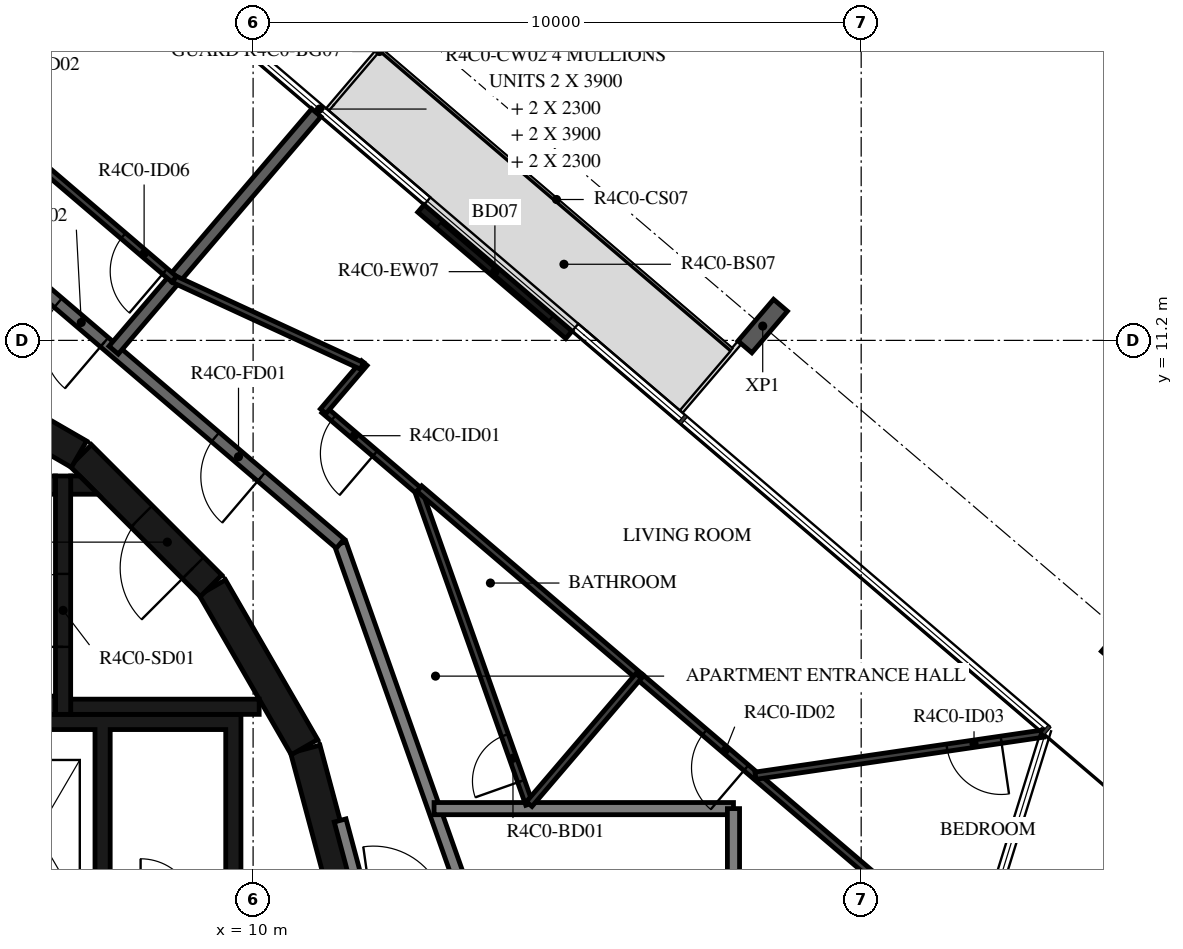
"""IFC4 building model, lengths in metres.
Left out: names, types, materials, properties, quantities, classifications, styles, units other than length and angle.
Written with IfcOpenShell. Run it as: python <this file> out.ifc"""

import sys

from ifc_helpers import new_model, si_unit, direction, frame, frame_2d, origin, origin_2d, place, context, subcontext, project, spatial, polyline, rectangle, i_section, outline, extrude, element, fill, save


model = new_model("IFC4")
c1 = context("Model", 3, precision=1e-05, world=origin(), true_north=direction((0.0, 1.0)))
c2 = subcontext(c1, "Body", "Model", "MODEL_VIEW")
j1 = project(units=[si_unit("LENGTHUNIT", "METRE"), si_unit("PLANEANGLEUNIT", "RADIAN")], contexts=[c1])
p1 = place(None, origin())
s1 = spatial("IfcSite", under=j1, at=p1, CompositionType="ELEMENT")
p2 = place(p1, origin())
s2 = spatial("IfcBuilding", under=s1, at=p2, CompositionType="ELEMENT")
p3 = place(p2, frame((0.0, 0.0, 179.7)))
s3 = spatial("IfcBuildingStorey", under=s2, at=p3, CompositionType="ELEMENT", Elevation=179.7)
for number, where, z_axis, x_axis in (
    (1, (24.358, 6.331, -0.38), (0.0, 0.0, 1.0), (0.76, -0.649, 0.0)),
    (2, (18.381, 11.436, -0.38), (0.0, 0.0, 1.0), (0.76, -0.649, 0.0)),
):
    element("IfcColumn", number, at=place(p3, frame(where, z_axis=z_axis, x_axis=x_axis)), inside=s3, PredefinedType="COLUMN", context=c2, shape_type="SweptSolid", body=[
        extrude(i_section(OverallWidth=0.3, OverallDepth=0.9, WebThickness=0.019, FlangeThickness=0.035, FilletRadius=0.03, at=origin_2d()), origin(), (0.0, 0.0, 1.0), 2.616),
    ])
p4 = place(p3, frame((15.193, 11.291, 0.0), z_axis=(0.0, 0.0, 1.0), x_axis=(-0.760391731187, 0.649464714317, 0.0)))
e3 = element("IfcWall", 3, at=p4, inside=s3, PredefinedType="STANDARD", context=c2, shape_type="SweptSolid", body=[
    extrude(rectangle(XDim=3.2, YDim=0.16, at=frame_2d((1.6, 0.0))), origin(), (0.0, 0.0, 1.0), 3.05),
])
p5 = place(p4, frame((0.4, 0.0, 0.0)))
e4 = element("IfcOpeningElement", 4, at=p5, cuts=e3, PredefinedType="OPENING", context=c2, shape_type="SweptSolid", body=[
    extrude(rectangle(XDim=2.4, YDim=2.4, at=frame_2d((1.2, 1.2))), frame((0.0, 0.09, 0.0), z_axis=(0.0, -1.0, 0.0), x_axis=(1.0, 0.0, 0.0)), (0.0, 0.0, 1.0), 0.18),
])
for number, where, z_axis, x_axis in (
    (5, (11.643, 1.55, 0.0), (0.0, 0.0, 1.0), (-0.259, 0.966, 0.0)),
    (6, (10.845, 4.51, 0.0), (0.0, 0.0, 1.0), (-0.5, 0.866, 0.0)),
):
    element("IfcWall", number, at=place(p3, frame(where, z_axis=z_axis, x_axis=x_axis)), inside=s3, PredefinedType="SHEAR", context=c2, shape_type="SweptSolid", body=[
        extrude(rectangle(XDim=3.033, YDim=0.5, at=frame_2d((1.516, 0.0))), origin(), (0.0, 0.0, 1.0), 3.05),
    ])
p6 = place(p3, frame((9.308, 7.164, 0.0), z_axis=(0.0, 0.0, 1.0), x_axis=(-0.707106781187, 0.707106781187, 0.0)))
e7 = element("IfcWall", 7, at=p6, inside=s3, PredefinedType="SHEAR", context=c2, shape_type="SweptSolid", body=[
    extrude(rectangle(XDim=3.032, YDim=0.5, at=frame_2d((1.516, 0.0))), origin(), (0.0, 0.0, 1.0), 3.05),
])
p7 = place(p6, frame((0.416, 0.0, 0.0)))
e8 = element("IfcOpeningElement", 8, at=p7, cuts=e7, PredefinedType="OPENING", context=c2, shape_type="SweptSolid", body=[
    extrude(rectangle(XDim=1.2, YDim=2.1, at=frame_2d((0.6, 1.05))), frame((0.0, 0.26, 0.0), z_axis=(0.0, -1.0, 0.0), x_axis=(1.0, 0.0, 0.0)), (0.0, 0.0, 1.0), 0.52),
])
p8 = place(p3, frame((7.137, 9.329, 0.0), z_axis=(0.0, 0.0, 1.0), x_axis=(-0.865975092491, 0.500087131594, 0.0)))
e9 = element("IfcWall", 9, at=p8, inside=s3, PredefinedType="SHEAR", context=c2, shape_type="SweptSolid", body=[
    extrude(rectangle(XDim=3.033, YDim=0.5, at=frame_2d((1.516, 0.0))), origin(), (0.0, 0.0, 1.0), 3.05),
])
p9 = place(p8, frame((1.066, 0.0, 0.0)))
e10 = element("IfcOpeningElement", 10, at=p9, cuts=e9, PredefinedType="OPENING", context=c2, shape_type="SweptSolid", body=[
    extrude(rectangle(XDim=0.9, YDim=2.1, at=frame_2d((0.45, 1.05))), frame((0.0, 0.26, 0.0), z_axis=(0.0, -1.0, 0.0), x_axis=(1.0, 0.0, 0.0)), (0.0, 0.0, 1.0), 0.52),
])
for number, where, z_axis, x_axis in (
    (11, (0.0, 5.2, 0.0), (0.0, 0.0, 1.0), (1.0, 0.0, 0.0)),
    (12, (0.0, 8.82, 0.0), (0.0, 0.0, 1.0), (1.0, 0.0, 0.0)),
):
    element("IfcWall", number, at=place(p3, frame(where, z_axis=z_axis, x_axis=x_axis)), inside=s3, PredefinedType="SHEAR", context=c2, shape_type="SweptSolid", body=[
        extrude(rectangle(XDim=6.75, YDim=0.3, at=frame_2d((3.375, 0.0))), origin(), (0.0, 0.0, 1.0), 3.05),
    ])
p10 = place(p3, frame((6.875, 5.05, 0.0), z_axis=(0.0, 0.0, 1.0), x_axis=(0.0, 1.0, 0.0)))
e13 = element("IfcWall", 13, at=p10, inside=s3, PredefinedType="SHEAR", context=c2, shape_type="SweptSolid", body=[
    extrude(rectangle(XDim=3.92, YDim=0.25, at=frame_2d((1.96, 0.0))), origin(), (0.0, 0.0, 1.0), 3.05),
])
p11 = place(p10, frame((1.11, 0.0, 0.0)))
e14 = element("IfcOpeningElement", 14, at=p11, cuts=e13, PredefinedType="OPENING", context=c2, shape_type="SweptSolid", body=[
    extrude(rectangle(XDim=1.2, YDim=2.1, at=frame_2d((0.6, 1.05))), frame((0.0, 0.135, 0.0), z_axis=(0.0, -1.0, 0.0), x_axis=(1.0, 0.0, 0.0)), (0.0, 0.0, 1.0), 0.27),
])
p12 = place(p3, frame((7.0, 5.175, 0.0), z_axis=(0.0, 0.0, 1.0), x_axis=(1.0, 0.0, 0.0)))
e15 = element("IfcWall", 15, at=p12, inside=s3, PredefinedType="SHEAR", context=c2, shape_type="SweptSolid", body=[
    extrude(rectangle(XDim=3.1, YDim=0.25, at=frame_2d((1.55, 0.0))), origin(), (0.0, 0.0, 1.0), 3.05),
])
p13 = place(p3, origin())
e16 = element("IfcWall", 16, at=p13, inside=s3, PredefinedType="SHEAR", context=c2, shape_type="SweptSolid", body=[
    extrude(outline(polyline([(7.448, 8.67), (7.0, 8.67), (7.0, 8.97), (7.148, 8.97), (7.448, 8.67)])), origin(), (0.0, 0.0, 1.0), 3.05),
])
p14 = place(p3, origin())
e17 = element("IfcWall", 17, at=p14, inside=s3, PredefinedType="SHEAR", context=c2, shape_type="SweptSolid", body=[
    extrude(outline(polyline([(-9.55, 4.8), (-1.2, 4.8), (-1.2, 1.9), (-0.95, 1.9), (-0.95, 4.8), (0.95, 4.8), (0.95, 1.9), (1.2, 1.9), (1.2, 4.8), (3.1, 4.8), (3.1, 1.9), (3.35, 1.9), (3.35, 4.8), (5.25, 4.8), (5.25, 1.9), (5.5, 1.9), (5.5, 4.8), (7.4, 4.8), (7.4, 1.9), (7.65, 1.9), (7.65, 4.8), (9.55, 4.8), (9.55, 1.9), (9.8, 1.9), (9.8, 4.8), (9.8, 5.05), (-9.8, 5.05), (-9.8, 4.8), (-9.8, 1.9), (-9.55, 1.9), (-9.55, 4.8)])), origin(), (0.0, 0.0, 1.0), 3.05),
])
p15 = place(p3, frame((11.87, 1.668, 0.0), z_axis=(0.0, 0.0, 1.0), x_axis=(-0.258836880648, 0.965921047093, 0.0)))
e18 = element("IfcWall", 18, at=p15, inside=s3, PredefinedType="STANDARD", context=c2, shape_type="SweptSolid", body=[
    extrude(rectangle(XDim=1.695, YDim=0.2, at=frame_2d((0.848, 0.0))), origin(), (0.0, 0.0, 1.0), 3.05),
])
p16 = place(p3, frame((13.542, 1.903, 0.0), z_axis=(0.0, 0.0, 1.0), x_axis=(-0.333808508206, 0.942640907159, 0.0)))
e19 = element("IfcWall", 19, at=p16, inside=s3, PredefinedType="STANDARD", context=c2, shape_type="SweptSolid", body=[
    extrude(rectangle(XDim=6.317, YDim=0.2, at=frame_2d((3.158, 0.0))), origin(), (0.0, 0.0, 1.0), 3.05),
])
p17 = place(p3, frame((11.433, 7.858, 0.0), z_axis=(0.0, 0.0, 1.0), x_axis=(-0.760412154545, 0.649440801937, 0.0)))
e20 = element("IfcWall", 20, at=p17, inside=s3, PredefinedType="STANDARD", context=c2, shape_type="SweptSolid", body=[
    extrude(rectangle(XDim=7.181, YDim=0.2, at=frame_2d((3.59, 0.0))), origin(), (0.0, 0.0, 1.0), 3.05),
])
p18 = place(p17, frame((1.7, 0.0, 0.0)))
e21 = element("IfcOpeningElement", 21, at=p18, cuts=e20, PredefinedType="OPENING", context=c2, shape_type="SweptSolid", body=[
    extrude(rectangle(XDim=1.0, YDim=2.1, at=frame_2d((0.5, 1.05))), frame((0.0, 0.11, 0.0), z_axis=(0.0, -1.0, 0.0), x_axis=(1.0, 0.0, 0.0)), (0.0, 0.0, 1.0), 0.22),
])
p19 = place(p17, frame((5.101, 0.0, 0.0)))
e22 = element("IfcOpeningElement", 22, at=p19, cuts=e20, PredefinedType="OPENING", context=c2, shape_type="SweptSolid", body=[
    extrude(rectangle(XDim=1.0, YDim=2.1, at=frame_2d((0.5, 1.05))), frame((0.0, 0.11, 0.0), z_axis=(0.0, -1.0, 0.0), x_axis=(1.0, 0.0, 0.0)), (0.0, 0.0, 1.0), 0.22),
])
p20 = place(p3, frame((17.9, 3.5, 0.0), z_axis=(0.0, 0.0, 1.0), x_axis=(-1.0, 0.0, 0.0)))
e23 = element("IfcWall", 23, at=p20, inside=s3, PredefinedType="STANDARD", context=c2, shape_type="SweptSolid", body=[
    extrude(rectangle(XDim=4.924, YDim=0.2, at=frame_2d((2.462, 0.0))), origin(), (0.0, 0.0, 1.0), 3.05),
])
p21 = place(p3, frame((17.9, -3.318, 0.0), z_axis=(0.0, 0.0, 1.0), x_axis=(0.0, 1.0, 0.0)))
e24 = element("IfcWall", 24, at=p21, inside=s3, PredefinedType="STANDARD", context=c2, shape_type="SweptSolid", body=[
    extrude(rectangle(XDim=6.818, YDim=0.2, at=frame_2d((3.409, 0.0))), origin(), (0.0, 0.0, 1.0), 3.05),
])
p22 = place(p3, frame((11.04, 14.943, 0.0), z_axis=(0.0, 0.0, 1.0), x_axis=(-0.649442880087, -0.760410379666, 0.0)))
e25 = element("IfcWall", 25, at=p22, inside=s3, PredefinedType="STANDARD", context=c2, shape_type="SweptSolid", body=[
    extrude(rectangle(XDim=5.133, YDim=0.2, at=frame_2d((2.566, 0.0))), origin(), (0.0, 0.0, 1.0), 3.05),
])
p23 = place(p3, frame((14.541, 3.575, 0.0), z_axis=(0.0, 0.0, 1.0), x_axis=(-0.333799280318, 0.942644174893, 0.0)))
e26 = element("IfcWall", 26, at=p23, inside=s3, PredefinedType="PARTITIONING", context=c2, shape_type="SweptSolid", body=[
    extrude(rectangle(XDim=5.477, YDim=0.12, at=frame_2d((2.738, 0.0))), origin(), (0.0, 0.0, 1.0), 3.05),
])
p24 = place(p23, frame((0.4, 0.0, 0.0)))
e27 = element("IfcOpeningElement", 27, at=p24, cuts=e26, PredefinedType="OPENING", context=c2, shape_type="SweptSolid", body=[
    extrude(rectangle(XDim=0.8, YDim=2.1, at=frame_2d((0.4, 1.05))), frame((0.0, 0.07, 0.0), z_axis=(0.0, -1.0, 0.0), x_axis=(1.0, 0.0, 0.0)), (0.0, 0.0, 1.0), 0.14),
])
p25 = place(p3, frame((12.713, 8.737, 0.0), z_axis=(0.0, 0.0, 1.0), x_axis=(-0.760410825807, 0.649442357716, 0.0)))
e28 = element("IfcWall", 28, at=p25, inside=s3, PredefinedType="PARTITIONING", context=c2, shape_type="SweptSolid", body=[
    extrude(rectangle(XDim=2.029, YDim=0.12, at=frame_2d((1.014, 0.0))), origin(), (0.0, 0.0, 1.0), 3.05),
])
p26 = place(p25, frame((0.929, 0.0, 0.0)))
e29 = element("IfcOpeningElement", 29, at=p26, cuts=e28, PredefinedType="OPENING", context=c2, shape_type="SweptSolid", body=[
    extrude(rectangle(XDim=0.9, YDim=2.1, at=frame_2d((0.45, 1.05))), frame((0.0, 0.07, 0.0), z_axis=(0.0, -1.0, 0.0), x_axis=(1.0, 0.0, 0.0)), (0.0, 0.0, 1.0), 0.14),
])
p27 = place(p3, frame((12.734, 8.762, 0.0), z_axis=(0.0, 0.0, 1.0), x_axis=(0.760390484255, -0.649466174219, 0.0)))
e30 = element("IfcWall", 30, at=p27, inside=s3, PredefinedType="PARTITIONING", context=c2, shape_type="SweptSolid", body=[
    extrude(rectangle(XDim=4.783, YDim=0.12, at=frame_2d((2.391, 0.0))), origin(), (0.0, 0.0, 1.0), 3.05),
])
p28 = place(p3, frame((11.153, 10.034, 0.0), z_axis=(0.0, 0.0, 1.0), x_axis=(0.649381401329, 0.760462882466, 0.0)))
e31 = element("IfcWall", 31, at=p28, inside=s3, PredefinedType="PARTITIONING", context=c2, shape_type="SweptSolid", body=[
    extrude(rectangle(XDim=1.042, YDim=0.12, at=frame_2d((0.521, 0.0))), origin(), (0.0, 0.0, 1.0), 3.05),
])
p29 = place(p3, frame((11.79, 10.781, 0.0), z_axis=(0.0, 0.0, 1.0), x_axis=(-0.907999296286, 0.418971691101, 0.0)))
e32 = element("IfcWall", 32, at=p29, inside=s3, PredefinedType="PARTITIONING", context=c2, shape_type="SweptSolid", body=[
    extrude(rectangle(XDim=3.401, YDim=0.12, at=frame_2d((1.701, 0.0))), origin(), (0.0, 0.0, 1.0), 3.05),
])
p30 = place(p3, frame((23.411, -0.357, 0.0), z_axis=(0.0, 0.0, 1.0), x_axis=(-0.76041871148, 0.649433124525, 0.0)))
e33 = element("IfcWall", 33, at=p30, inside=s3, PredefinedType="PARTITIONING", context=c2, shape_type="SweptSolid", body=[
    extrude(rectangle(XDim=9.259, YDim=0.12, at=frame_2d((4.629, 0.0))), origin(), (0.0, 0.0, 1.0), 3.05),
])
p31 = place(p30, frame((6.972, 0.0, 0.0)))
e34 = element("IfcOpeningElement", 34, at=p31, cuts=e33, PredefinedType="OPENING", context=c2, shape_type="SweptSolid", body=[
    extrude(rectangle(XDim=0.9, YDim=2.1, at=frame_2d((0.45, 1.05))), frame((0.0, 0.07, 0.0), z_axis=(0.0, -1.0, 0.0), x_axis=(1.0, 0.0, 0.0)), (0.0, 0.0, 1.0), 0.14),
])
p32 = place(p30, frame((0.2, 0.0, 0.0)))
e35 = element("IfcOpeningElement", 35, at=p32, cuts=e33, PredefinedType="OPENING", context=c2, shape_type="SweptSolid", body=[
    extrude(rectangle(XDim=0.9, YDim=2.1, at=frame_2d((0.45, 1.05))), frame((0.0, 0.07, 0.0), z_axis=(0.0, -1.0, 0.0), x_axis=(1.0, 0.0, 0.0)), (0.0, 0.0, 1.0), 0.14),
])
p33 = place(p3, frame((16.341, 5.682, 0.0), z_axis=(0.0, 0.0, 1.0), x_axis=(-0.64946993237, -0.76038727432, 0.0)))
e36 = element("IfcWall", 36, at=p33, inside=s3, PredefinedType="PARTITIONING", context=c2, shape_type="SweptSolid", body=[
    extrude(rectangle(XDim=2.771, YDim=0.12, at=frame_2d((1.386, 0.0))), origin(), (0.0, 0.0, 1.0), 3.05),
])
p34 = place(p3, frame((22.994, 4.734, 0.0), z_axis=(0.0, 0.0, 1.0), x_axis=(-0.989449286977, -0.144879634529, 0.0)))
e37 = element("IfcWall", 37, at=p34, inside=s3, PredefinedType="PARTITIONING", context=c2, shape_type="SweptSolid", body=[
    extrude(rectangle(XDim=4.782, YDim=0.12, at=frame_2d((2.391, 0.0))), origin(), (0.0, 0.0, 1.0), 3.05),
])
p35 = place(p34, frame((0.7, 0.0, 0.0)))
e38 = element("IfcOpeningElement", 38, at=p35, cuts=e37, PredefinedType="OPENING", context=c2, shape_type="SweptSolid", body=[
    extrude(rectangle(XDim=0.9, YDim=2.1, at=frame_2d((0.45, 1.05))), frame((0.0, 0.07, 0.0), z_axis=(0.0, -1.0, 0.0), x_axis=(1.0, 0.0, 0.0)), (0.0, 0.0, 1.0), 0.14),
])
p36 = place(p3, frame((8.702, 12.206, 0.0), z_axis=(0.0, 0.0, 1.0), x_axis=(-0.760401313718, 0.649453494945, 0.0)))
e39 = element("IfcWall", 39, at=p36, inside=s3, PredefinedType="PARTITIONING", context=c2, shape_type="SweptSolid", body=[
    extrude(rectangle(XDim=16.724, YDim=0.12, at=frame_2d((8.362, 0.0))), origin(), (0.0, 0.0, 1.0), 3.05),
])
p37 = place(p36, frame((0.2, 0.0, 0.0)))
e40 = element("IfcOpeningElement", 40, at=p37, cuts=e39, PredefinedType="OPENING", context=c2, shape_type="SweptSolid", body=[
    extrude(rectangle(XDim=0.9, YDim=2.1, at=frame_2d((0.45, 1.05))), frame((0.0, 0.07, 0.0), z_axis=(0.0, -1.0, 0.0), x_axis=(1.0, 0.0, 0.0)), (0.0, 0.0, 1.0), 0.14),
])
p38 = place(p36, frame((8.02, 0.0, 0.0)))
e41 = element("IfcOpeningElement", 41, at=p38, cuts=e39, PredefinedType="OPENING", context=c2, shape_type="SweptSolid", body=[
    extrude(rectangle(XDim=0.9, YDim=2.1, at=frame_2d((0.45, 1.05))), frame((0.0, 0.07, 0.0), z_axis=(0.0, -1.0, 0.0), x_axis=(1.0, 0.0, 0.0)), (0.0, 0.0, 1.0), 0.14),
])
p39 = place(p36, frame((14.412, 0.0, 0.0)))
e42 = element("IfcOpeningElement", 42, at=p39, cuts=e39, PredefinedType="OPENING", context=c2, shape_type="SweptSolid", body=[
    extrude(rectangle(XDim=0.9, YDim=2.1, at=frame_2d((0.45, 1.05))), frame((0.0, 0.07, 0.0), z_axis=(0.0, -1.0, 0.0), x_axis=(1.0, 0.0, 0.0)), (0.0, 0.0, 1.0), 0.14),
])
p40 = place(p5, origin())
e43 = element("IfcDoor", 43, at=p40, inside=s3, OperationType="DOUBLE_DOOR_SLIDING", PredefinedType="DOOR", context=c2, shape_type="SweptSolid", body=[
    extrude(rectangle(XDim=2.4, YDim=2.4, at=frame_2d((1.2, 1.2))), frame((0.0, 0.025, 0.0), z_axis=(0.0, -1.0, 0.0), x_axis=(1.0, 0.0, 0.0)), (0.0, 0.0, 1.0), 0.05),
])
fill(e4, e43)
p41 = place(p11, origin())
e44 = element("IfcDoor", 44, at=p41, inside=s3, OperationType="SINGLE_SWING_LEFT", PredefinedType="DOOR", context=c2, shape_type="SweptSolid", body=[
    extrude(rectangle(XDim=1.2, YDim=2.1, at=frame_2d((0.6, 1.05))), frame((0.0, 0.025, 0.0), z_axis=(0.0, -1.0, 0.0), x_axis=(1.0, 0.0, 0.0)), (0.0, 0.0, 1.0), 0.05),
])
fill(e14, e44)
p42 = place(p7, origin())
e45 = element("IfcDoor", 45, at=p42, inside=s3, OperationType="SINGLE_SWING_RIGHT", PredefinedType="DOOR", context=c2, shape_type="SweptSolid", body=[
    extrude(rectangle(XDim=1.2, YDim=2.1, at=frame_2d((0.6, 1.05))), frame((0.0, 0.025, 0.0), z_axis=(0.0, -1.0, 0.0), x_axis=(1.0, 0.0, 0.0)), (0.0, 0.0, 1.0), 0.05),
])
fill(e8, e45)
p43 = place(p18, origin())
e46 = element("IfcDoor", 46, at=p43, inside=s3, OperationType="SINGLE_SWING_LEFT", PredefinedType="DOOR", context=c2, shape_type="SweptSolid", body=[
    extrude(rectangle(XDim=1.0, YDim=2.1, at=frame_2d((0.5, 1.05))), frame((0.0, 0.025, 0.0), z_axis=(0.0, -1.0, 0.0), x_axis=(1.0, 0.0, 0.0)), (0.0, 0.0, 1.0), 0.05),
])
fill(e21, e46)
p44 = place(p24, origin())
e47 = element("IfcDoor", 47, at=p44, inside=s3, OperationType="SINGLE_SWING_LEFT", PredefinedType="DOOR", context=c2, shape_type="SweptSolid", body=[
    extrude(rectangle(XDim=0.8, YDim=2.1, at=frame_2d((0.4, 1.05))), frame((0.0, 0.025, 0.0), z_axis=(0.0, -1.0, 0.0), x_axis=(1.0, 0.0, 0.0)), (0.0, 0.0, 1.0), 0.05),
])
fill(e27, e47)
p45 = place(p26, origin())
e48 = element("IfcDoor", 48, at=p45, inside=s3, OperationType="SINGLE_SWING_LEFT", PredefinedType="DOOR", context=c2, shape_type="SweptSolid", body=[
    extrude(rectangle(XDim=0.9, YDim=2.1, at=frame_2d((0.45, 1.05))), frame((0.0, 0.025, 0.0), z_axis=(0.0, -1.0, 0.0), x_axis=(1.0, 0.0, 0.0)), (0.0, 0.0, 1.0), 0.05),
])
fill(e29, e48)
p46 = place(p31, origin())
e49 = element("IfcDoor", 49, at=p46, inside=s3, OperationType="SINGLE_SWING_RIGHT", PredefinedType="DOOR", context=c2, shape_type="SweptSolid", body=[
    extrude(rectangle(XDim=0.9, YDim=2.1, at=frame_2d((0.45, 1.05))), frame((0.0, 0.025, 0.0), z_axis=(0.0, -1.0, 0.0), x_axis=(1.0, 0.0, 0.0)), (0.0, 0.0, 1.0), 0.05),
])
fill(e34, e49)
p47 = place(p35, origin())
e50 = element("IfcDoor", 50, at=p47, inside=s3, OperationType="SINGLE_SWING_LEFT", PredefinedType="DOOR", context=c2, shape_type="SweptSolid", body=[
    extrude(rectangle(XDim=0.9, YDim=2.1, at=frame_2d((0.45, 1.05))), frame((0.0, 0.025, 0.0), z_axis=(0.0, -1.0, 0.0), x_axis=(1.0, 0.0, 0.0)), (0.0, 0.0, 1.0), 0.05),
])
fill(e38, e50)
p48 = place(p19, origin())
e51 = element("IfcDoor", 51, at=p48, inside=s3, OperationType="SINGLE_SWING_RIGHT", PredefinedType="DOOR", context=c2, shape_type="SweptSolid", body=[
    extrude(rectangle(XDim=1.0, YDim=2.1, at=frame_2d((0.5, 1.05))), frame((0.0, 0.025, 0.0), z_axis=(0.0, -1.0, 0.0), x_axis=(1.0, 0.0, 0.0)), (0.0, 0.0, 1.0), 0.05),
])
fill(e22, e51)
p49 = place(p37, origin())
e52 = element("IfcDoor", 52, at=p49, inside=s3, OperationType="SINGLE_SWING_RIGHT", PredefinedType="DOOR", context=c2, shape_type="SweptSolid", body=[
    extrude(rectangle(XDim=0.9, YDim=2.1, at=frame_2d((0.45, 1.05))), frame((0.0, 0.025, 0.0), z_axis=(0.0, -1.0, 0.0), x_axis=(1.0, 0.0, 0.0)), (0.0, 0.0, 1.0), 0.05),
])
fill(e40, e52)
save(model, sys.argv[1])
